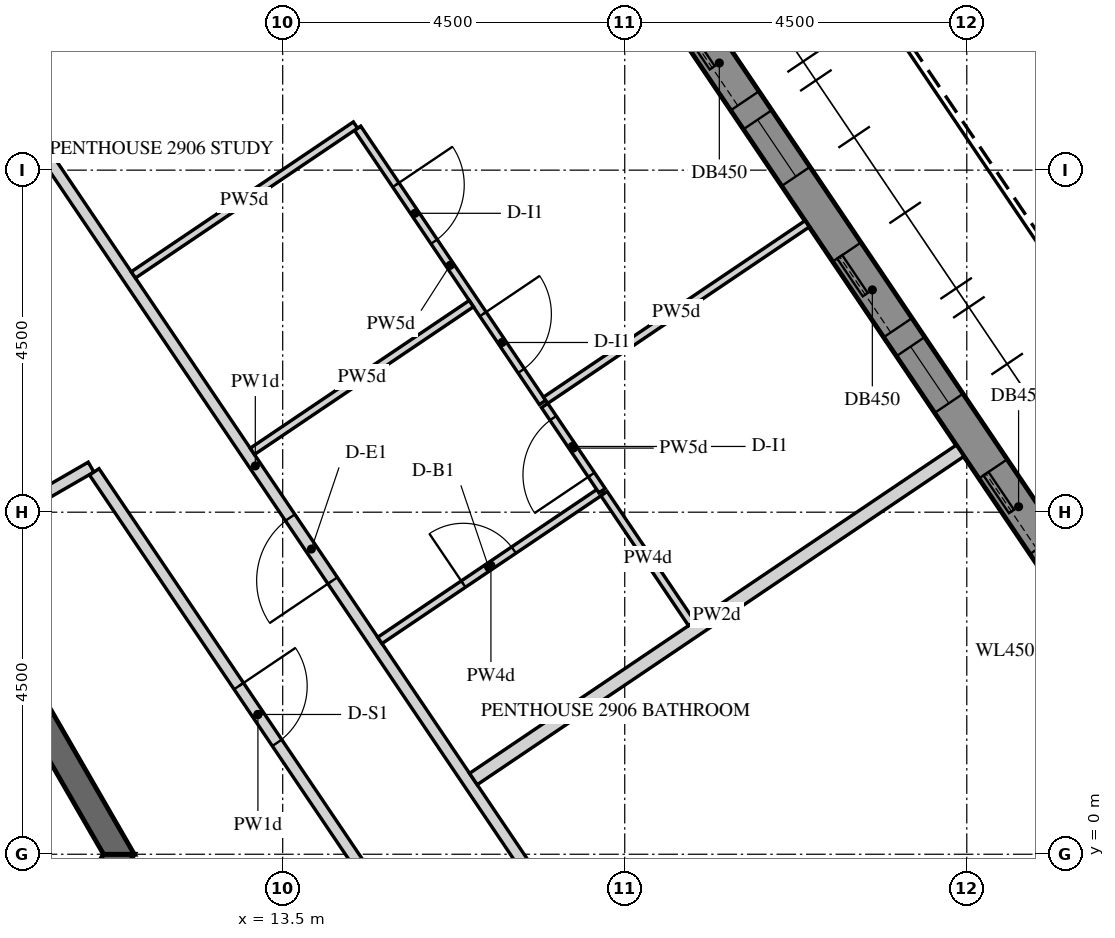
"""IFC4 building model, lengths in metres.
Left out: names, types, materials, properties, quantities, classifications, styles, units other than length and angle.
Written with IfcOpenShell. Run it as: python <this file> out.ifc"""

import sys

from ifc_helpers import new_model, si_unit, direction, frame, frame_2d, origin, place, context, subcontext, project, spatial, polyline, rectangle, outline, extrude, element, fill, save


model = new_model("IFC4")
c1 = context("Model", 3, precision=1e-05, world=origin(), true_north=direction((0.0, 1.0)))
c2 = subcontext(c1, "Body", "Model", "MODEL_VIEW")
j1 = project(units=[si_unit("LENGTHUNIT", "METRE"), si_unit("PLANEANGLEUNIT", "RADIAN")], contexts=[c1])
p1 = place(None, origin())
s1 = spatial("IfcSite", under=j1, at=p1, CompositionType="ELEMENT")
p2 = place(p1, origin())
s2 = spatial("IfcBuilding", under=s1, at=p2, CompositionType="ELEMENT")
p3 = place(p2, frame((0.0, 0.0, 372.9)))
s3 = spatial("IfcBuildingStorey", under=s2, at=p3, CompositionType="ELEMENT", Elevation=372.9)
p4 = place(p3, frame((24.37, 2.811, -0.15), z_axis=(0.0, 0.0, 1.0), x_axis=(-0.559187034749, 0.829041531027, 0.0)))
e1 = element("IfcWall", 1, at=p4, inside=s3, PredefinedType="SOLIDWALL", context=c2, shape_type="SweptSolid", body=[
    extrude(outline(polyline([(0.225, -0.225), (20.506, -0.225), (20.957, 0.225), (-0.225, 0.225), (0.225, -0.225)])), origin(), (0.0, 0.0, 1.0), 3.55),
])
p5 = place(p4, frame((0.325, 0.0, 1.05)))
e2 = element("IfcOpeningElement", 2, at=p5, cuts=e1, PredefinedType="OPENING", context=c2, shape_type="SweptSolid", body=[
    extrude(rectangle(XDim=0.9, YDim=1.5, at=frame_2d((0.45, 0.75))), frame((0.0, 0.235, 0.0), z_axis=(0.0, -1.0, 0.0), x_axis=(1.0, 0.0, 0.0)), (0.0, 0.0, 1.0), 0.47),
])
p6 = place(p4, frame((1.525, 0.0, 0.15)))
e3 = element("IfcOpeningElement", 3, at=p6, cuts=e1, PredefinedType="OPENING", context=c2, shape_type="SweptSolid", body=[
    extrude(rectangle(XDim=1.2, YDim=2.4, at=frame_2d((0.6, 1.2))), frame((0.0, 0.235, 0.0), z_axis=(0.0, -1.0, 0.0), x_axis=(1.0, 0.0, 0.0)), (0.0, 0.0, 1.0), 0.47),
])
p7 = place(p4, frame((3.766, 0.0, 1.05)))
e4 = element("IfcOpeningElement", 4, at=p7, cuts=e1, PredefinedType="OPENING", context=c2, shape_type="SweptSolid", body=[
    extrude(rectangle(XDim=0.9, YDim=1.5, at=frame_2d((0.45, 0.75))), frame((0.0, 0.235, 0.0), z_axis=(0.0, -1.0, 0.0), x_axis=(1.0, 0.0, 0.0)), (0.0, 0.0, 1.0), 0.47),
])
p8 = place(p4, frame((4.966, 0.0, 0.15)))
e5 = element("IfcOpeningElement", 5, at=p8, cuts=e1, PredefinedType="OPENING", context=c2, shape_type="SweptSolid", body=[
    extrude(rectangle(XDim=1.2, YDim=2.4, at=frame_2d((0.6, 1.2))), frame((0.0, 0.235, 0.0), z_axis=(0.0, -1.0, 0.0), x_axis=(1.0, 0.0, 0.0)), (0.0, 0.0, 1.0), 0.47),
])
p9 = place(p4, frame((7.366, 0.0, 1.05)))
e6 = element("IfcOpeningElement", 6, at=p9, cuts=e1, PredefinedType="OPENING", context=c2, shape_type="SweptSolid", body=[
    extrude(rectangle(XDim=0.9, YDim=1.5, at=frame_2d((0.45, 0.75))), frame((0.0, 0.235, 0.0), z_axis=(0.0, -1.0, 0.0), x_axis=(1.0, 0.0, 0.0)), (0.0, 0.0, 1.0), 0.47),
])
p10 = place(p4, frame((8.566, 0.0, 0.15)))
e7 = element("IfcOpeningElement", 7, at=p10, cuts=e1, PredefinedType="OPENING", context=c2, shape_type="SweptSolid", body=[
    extrude(rectangle(XDim=1.2, YDim=2.4, at=frame_2d((0.6, 1.2))), frame((0.0, 0.235, 0.0), z_axis=(0.0, -1.0, 0.0), x_axis=(1.0, 0.0, 0.0)), (0.0, 0.0, 1.0), 0.47),
])
p11 = place(p4, frame((10.966, 0.0, 1.05)))
e8 = element("IfcOpeningElement", 8, at=p11, cuts=e1, PredefinedType="OPENING", context=c2, shape_type="SweptSolid", body=[
    extrude(rectangle(XDim=0.9, YDim=1.5, at=frame_2d((0.45, 0.75))), frame((0.0, 0.235, 0.0), z_axis=(0.0, -1.0, 0.0), x_axis=(1.0, 0.0, 0.0)), (0.0, 0.0, 1.0), 0.47),
])
p12 = place(p4, frame((12.166, 0.0, 0.15)))
e9 = element("IfcOpeningElement", 9, at=p12, cuts=e1, PredefinedType="OPENING", context=c2, shape_type="SweptSolid", body=[
    extrude(rectangle(XDim=1.2, YDim=2.4, at=frame_2d((0.6, 1.2))), frame((0.0, 0.235, 0.0), z_axis=(0.0, -1.0, 0.0), x_axis=(1.0, 0.0, 0.0)), (0.0, 0.0, 1.0), 0.47),
])
p13 = place(p4, frame((14.566, 0.0, 1.05)))
e10 = element("IfcOpeningElement", 10, at=p13, cuts=e1, PredefinedType="OPENING", context=c2, shape_type="SweptSolid", body=[
    extrude(rectangle(XDim=0.9, YDim=1.5, at=frame_2d((0.45, 0.75))), frame((0.0, 0.235, 0.0), z_axis=(0.0, -1.0, 0.0), x_axis=(1.0, 0.0, 0.0)), (0.0, 0.0, 1.0), 0.47),
])
p14 = place(p4, frame((15.766, 0.0, 0.15)))
e11 = element("IfcOpeningElement", 11, at=p14, cuts=e1, PredefinedType="OPENING", context=c2, shape_type="SweptSolid", body=[
    extrude(rectangle(XDim=1.2, YDim=2.4, at=frame_2d((0.6, 1.2))), frame((0.0, 0.235, 0.0), z_axis=(0.0, -1.0, 0.0), x_axis=(1.0, 0.0, 0.0)), (0.0, 0.0, 1.0), 0.47),
])
p15 = place(p4, frame((18.007, 0.0, 1.05)))
e12 = element("IfcOpeningElement", 12, at=p15, cuts=e1, PredefinedType="OPENING", context=c2, shape_type="SweptSolid", body=[
    extrude(rectangle(XDim=0.9, YDim=1.5, at=frame_2d((0.45, 0.75))), frame((0.0, 0.235, 0.0), z_axis=(0.0, -1.0, 0.0), x_axis=(1.0, 0.0, 0.0)), (0.0, 0.0, 1.0), 0.47),
])
p16 = place(p4, frame((19.207, 0.0, 0.15)))
e13 = element("IfcOpeningElement", 13, at=p16, cuts=e1, PredefinedType="OPENING", context=c2, shape_type="SweptSolid", body=[
    extrude(rectangle(XDim=1.2, YDim=2.4, at=frame_2d((0.6, 1.2))), frame((0.0, 0.235, 0.0), z_axis=(0.0, -1.0, 0.0), x_axis=(1.0, 0.0, 0.0)), (0.0, 0.0, 1.0), 0.47),
])
p17 = place(p3, frame((5.673, -9.825, -0.15), z_axis=(0.0, 0.0, 1.0), x_axis=(0.499995046907, 0.866028263435, 0.0)))
e14 = element("IfcWall", 14, at=p17, inside=s3, PredefinedType="SHEAR", context=c2, shape_type="SweptSolid", body=[
    extrude(outline(polyline([(-0.101, -0.175), (11.446, -0.175), (11.244, 0.175), (0.101, 0.175), (-0.101, -0.175)])), origin(), (0.0, 0.0, 1.0), 3.55),
])
p18 = place(p17, frame((4.801, 0.0, 0.15)))
e15 = element("IfcOpeningElement", 15, at=p18, cuts=e14, PredefinedType="OPENING", context=c2, shape_type="SweptSolid", body=[
    extrude(rectangle(XDim=1.8, YDim=2.4, at=frame_2d((0.9, 1.2))), frame((0.0, 0.185, 0.0), z_axis=(0.0, -1.0, 0.0), x_axis=(1.0, 0.0, 0.0)), (0.0, 0.0, 1.0), 0.37),
])
p19 = place(p3, frame((11.345, 0.0, -0.15), z_axis=(0.0, 0.0, 1.0), x_axis=(-0.499995046907, 0.866028263435, 0.0)))
e16 = element("IfcWall", 16, at=p19, inside=s3, PredefinedType="SHEAR", context=c2, shape_type="SweptSolid", body=[
    extrude(outline(polyline([(-0.101, -0.175), (11.446, -0.175), (11.244, 0.175), (0.101, 0.175), (-0.101, -0.175)])), origin(), (0.0, 0.0, 1.0), 3.55),
])
p20 = place(p19, frame((4.744, 0.0, 0.15)))
e17 = element("IfcOpeningElement", 17, at=p20, cuts=e16, PredefinedType="OPENING", context=c2, shape_type="SweptSolid", body=[
    extrude(rectangle(XDim=1.8, YDim=2.4, at=frame_2d((0.9, 1.2))), frame((0.0, 0.185, 0.0), z_axis=(0.0, -1.0, 0.0), x_axis=(1.0, 0.0, 0.0)), (0.0, 0.0, 1.0), 0.37),
])
p21 = place(p3, frame((5.773, 10.0, -0.15), z_axis=(0.0, 0.0, 1.0), x_axis=(0.500007911273, 0.866020836161, 0.0)))
e18 = element("IfcWall", 18, at=p21, inside=s3, PredefinedType="SHEAR", context=c2, shape_type="SweptSolid", body=[
    extrude(rectangle(XDim=14.51, YDim=0.35, at=frame_2d((7.255, 0.0))), origin(), (0.0, 0.0, 1.0), 3.55),
])
p22 = place(p21, frame((6.355, 0.0, 0.15)))
e19 = element("IfcOpeningElement", 19, at=p22, cuts=e18, PredefinedType="OPENING", context=c2, shape_type="SweptSolid", body=[
    extrude(rectangle(XDim=1.8, YDim=2.4, at=frame_2d((0.9, 1.2))), frame((0.0, 0.185, 0.0), z_axis=(0.0, -1.0, 0.0), x_axis=(1.0, 0.0, 0.0)), (0.0, 0.0, 1.0), 0.37),
])
p23 = place(p3, frame((17.401, -1.21, 0.0), z_axis=(0.0, 0.0, 1.0), x_axis=(-0.559186729505, 0.829041736914, 0.0)))
e20 = element("IfcWall", 20, at=p23, inside=s3, PredefinedType="PARTITIONING", context=c2, shape_type="SweptSolid", body=[
    extrude(rectangle(XDim=15.243, YDim=0.15, at=frame_2d((7.621, 0.0))), origin(), (0.0, 0.0, 1.0), 2.47),
])
p24 = place(p23, frame((5.802, 0.0, 0.0)))
e21 = element("IfcOpeningElement", 21, at=p24, cuts=e20, PredefinedType="OPENING", context=c2, shape_type="SweptSolid", body=[
    extrude(rectangle(XDim=1.0, YDim=2.1, at=frame_2d((0.5, 1.05))), frame((0.0, 0.085, 0.0), z_axis=(0.0, -1.0, 0.0), x_axis=(1.0, 0.0, 0.0)), (0.0, 0.0, 1.0), 0.17),
])
p25 = place(p3, frame((9.2, 4.066, 0.0), z_axis=(0.0, 0.0, 1.0), x_axis=(0.866011447264, 0.500024172624, 0.0)))
e22 = element("IfcWall", 22, at=p25, inside=s3, PredefinedType="PARTITIONING", context=c2, shape_type="SweptSolid", body=[
    extrude(rectangle(XDim=2.055, YDim=0.15, at=frame_2d((1.027, 0.0))), origin(), (0.0, 0.0, 1.0), 2.47),
])
p26 = place(p3, frame((11.021, 5.031, 0.0), z_axis=(0.0, 0.0, 1.0), x_axis=(0.559191842266, -0.829038288346, 0.0)))
e23 = element("IfcWall", 23, at=p26, inside=s3, PredefinedType="PARTITIONING", context=c2, shape_type="SweptSolid", body=[
    extrude(rectangle(XDim=7.7, YDim=0.15, at=frame_2d((3.85, 0.0))), origin(), (0.0, 0.0, 1.0), 2.47),
])
p27 = place(p26, frame((3.4, 0.0, 0.0)))
e24 = element("IfcOpeningElement", 24, at=p27, cuts=e23, PredefinedType="OPENING", context=c2, shape_type="SweptSolid", body=[
    extrude(rectangle(XDim=0.9, YDim=2.1, at=frame_2d((0.45, 1.05))), frame((0.0, 0.085, 0.0), z_axis=(0.0, -1.0, 0.0), x_axis=(1.0, 0.0, 0.0)), (0.0, 0.0, 1.0), 0.17),
])
p28 = place(p3, frame((22.413, 5.309, 0.0), z_axis=(0.0, 0.0, 1.0), x_axis=(-0.82903328576, -0.559199258853, 0.0)))
e25 = element("IfcWall", 25, at=p28, inside=s3, PredefinedType="PARTITIONING", context=c2, shape_type="SweptSolid", body=[
    extrude(rectangle(XDim=7.725, YDim=0.18, at=frame_2d((3.863, 0.0))), origin(), (0.0, 0.0, 1.0), 2.47),
])
p29 = place(p3, frame((14.485, 9.552, 0.0), z_axis=(0.0, 0.0, 1.0), x_axis=(0.559171259418, -0.829052171242, 0.0)))
e26 = element("IfcWall", 26, at=p29, inside=s3, PredefinedType="PARTITIONING", context=c2, shape_type="SweptSolid", body=[
    extrude(rectangle(XDim=4.352, YDim=0.1, at=frame_2d((2.176, 0.0))), origin(), (0.0, 0.0, 1.0), 2.47),
])
p30 = place(p29, frame((2.95, 0.0, 0.0)))
e27 = element("IfcOpeningElement", 27, at=p30, cuts=e26, PredefinedType="OPENING", context=c2, shape_type="SweptSolid", body=[
    extrude(rectangle(XDim=0.9, YDim=2.1, at=frame_2d((0.45, 1.05))), frame((0.0, 0.06, 0.0), z_axis=(0.0, -1.0, 0.0), x_axis=(1.0, 0.0, 0.0)), (0.0, 0.0, 1.0), 0.12),
])
p31 = place(p29, frame((0.9, 0.0, 0.0)))
e28 = element("IfcOpeningElement", 28, at=p31, cuts=e26, PredefinedType="OPENING", context=c2, shape_type="SweptSolid", body=[
    extrude(rectangle(XDim=0.9, YDim=2.1, at=frame_2d((0.45, 1.05))), frame((0.0, 0.06, 0.0), z_axis=(0.0, -1.0, 0.0), x_axis=(1.0, 0.0, 0.0)), (0.0, 0.0, 1.0), 0.12),
])
p32 = place(p3, frame((16.959, 5.973, 0.0), z_axis=(0.0, 0.0, 1.0), x_axis=(0.829060712991, 0.559158594833, 0.0)))
e29 = element("IfcWall", 29, at=p32, inside=s3, PredefinedType="PARTITIONING", context=c2, shape_type="SweptSolid", body=[
    extrude(rectangle(XDim=4.15, YDim=0.1, at=frame_2d((2.075, 0.0))), origin(), (0.0, 0.0, 1.0), 2.47),
])
p33 = place(p3, frame((11.535, 7.622, 0.0), z_axis=(0.0, 0.0, 1.0), x_axis=(0.829033300448, 0.559199237078, 0.0)))
e30 = element("IfcWall", 30, at=p33, inside=s3, PredefinedType="PARTITIONING", context=c2, shape_type="SweptSolid", body=[
    extrude(rectangle(XDim=3.525, YDim=0.1, at=frame_2d((1.763, 0.0))), origin(), (0.0, 0.0, 1.0), 2.47),
])
p34 = place(p3, frame((14.778, 2.813, 0.0), z_axis=(0.0, 0.0, 1.0), x_axis=(0.829033300448, 0.559199237078, 0.0)))
e31 = element("IfcWall", 31, at=p34, inside=s3, PredefinedType="PARTITIONING", context=c2, shape_type="SweptSolid", body=[
    extrude(rectangle(XDim=3.525, YDim=0.1, at=frame_2d((1.763, 0.0))), origin(), (0.0, 0.0, 1.0), 2.47),
])
p35 = place(p34, frame((1.325, 0.0, 0.0)))
e32 = element("IfcOpeningElement", 32, at=p35, cuts=e31, PredefinedType="OPENING", context=c2, shape_type="SweptSolid", body=[
    extrude(rectangle(XDim=0.8, YDim=2.1, at=frame_2d((0.4, 1.05))), frame((0.0, 0.06, 0.0), z_axis=(0.0, -1.0, 0.0), x_axis=(1.0, 0.0, 0.0)), (0.0, 0.0, 1.0), 0.12),
])
p36 = place(p3, frame((17.702, 4.783, 0.0), z_axis=(0.0, 0.0, 1.0), x_axis=(-0.559150326391, 0.829066289567, 0.0)))
e33 = element("IfcWall", 33, at=p36, inside=s3, PredefinedType="PARTITIONING", context=c2, shape_type="SweptSolid", body=[
    extrude(rectangle(XDim=1.352, YDim=0.1, at=frame_2d((0.676, 0.0))), origin(), (0.0, 0.0, 1.0), 2.47),
])
p37 = place(p36, frame((0.252, 0.0, 0.0)))
e34 = element("IfcOpeningElement", 34, at=p37, cuts=e33, PredefinedType="OPENING", context=c2, shape_type="SweptSolid", body=[
    extrude(rectangle(XDim=0.9, YDim=2.1, at=frame_2d((0.45, 1.05))), frame((0.0, 0.06, 0.0), z_axis=(0.0, -1.0, 0.0), x_axis=(1.0, 0.0, 0.0)), (0.0, 0.0, 1.0), 0.12),
])
p38 = place(p3, frame((15.982, 7.244, 0.0), z_axis=(0.0, 0.0, 1.0), x_axis=(-0.829044102949, -0.559183221642, 0.0)))
e35 = element("IfcWall", 35, at=p38, inside=s3, PredefinedType="PARTITIONING", context=c2, shape_type="SweptSolid", body=[
    extrude(rectangle(XDim=3.475, YDim=0.1, at=frame_2d((1.737, 0.0))), origin(), (0.0, 0.0, 1.0), 2.47),
])
p39 = place(p3, frame((18.881, 3.035, 0.0), z_axis=(0.0, 0.0, 1.0), x_axis=(-0.559200338399, 0.829032557584, 0.0)))
e36 = element("IfcWall", 36, at=p39, inside=s3, PredefinedType="PARTITIONING", context=c2, shape_type="SweptSolid", body=[
    extrude(rectangle(XDim=2.062, YDim=0.1, at=frame_2d((1.031, 0.0))), origin(), (0.0, 0.0, 1.0), 2.47),
])
p40 = place(p6, frame((0.0, 0.15, 0.0)))
e37 = element("IfcDoor", 37, at=p40, inside=s3, OperationType="SLIDING_TO_LEFT", PredefinedType="DOOR", context=c2, shape_type="SweptSolid", body=[
    extrude(rectangle(XDim=1.2, YDim=2.4, at=frame_2d((0.6, 1.2))), frame((0.0, 0.025, 0.0), z_axis=(0.0, -1.0, 0.0), x_axis=(1.0, 0.0, 0.0)), (0.0, 0.0, 1.0), 0.05),
])
fill(e3, e37)
p41 = place(p7, frame((0.0, 0.155, 0.0)))
e38 = element("IfcWindow", 38, at=p41, inside=s3, PartitioningType="SINGLE_PANEL", PredefinedType="WINDOW", context=c2, shape_type="SweptSolid", body=[
    extrude(rectangle(XDim=0.9, YDim=1.5, at=frame_2d((0.45, 0.75))), frame((0.0, 0.03, 0.0), z_axis=(0.0, -1.0, 0.0), x_axis=(1.0, 0.0, 0.0)), (0.0, 0.0, 1.0), 0.06),
])
fill(e4, e38)
p42 = place(p8, frame((0.0, 0.15, 0.0)))
e39 = element("IfcDoor", 39, at=p42, inside=s3, OperationType="SLIDING_TO_LEFT", PredefinedType="DOOR", context=c2, shape_type="SweptSolid", body=[
    extrude(rectangle(XDim=1.2, YDim=2.4, at=frame_2d((0.6, 1.2))), frame((0.0, 0.025, 0.0), z_axis=(0.0, -1.0, 0.0), x_axis=(1.0, 0.0, 0.0)), (0.0, 0.0, 1.0), 0.05),
])
fill(e5, e39)
p43 = place(p9, frame((0.0, 0.155, 0.0)))
e40 = element("IfcWindow", 40, at=p43, inside=s3, PartitioningType="SINGLE_PANEL", PredefinedType="WINDOW", context=c2, shape_type="SweptSolid", body=[
    extrude(rectangle(XDim=0.9, YDim=1.5, at=frame_2d((0.45, 0.75))), frame((0.0, 0.03, 0.0), z_axis=(0.0, -1.0, 0.0), x_axis=(1.0, 0.0, 0.0)), (0.0, 0.0, 1.0), 0.06),
])
fill(e6, e40)
p44 = place(p10, frame((0.0, 0.15, 0.0)))
e41 = element("IfcDoor", 41, at=p44, inside=s3, OperationType="SLIDING_TO_LEFT", PredefinedType="DOOR", context=c2, shape_type="SweptSolid", body=[
    extrude(rectangle(XDim=1.2, YDim=2.4, at=frame_2d((0.6, 1.2))), frame((0.0, 0.025, 0.0), z_axis=(0.0, -1.0, 0.0), x_axis=(1.0, 0.0, 0.0)), (0.0, 0.0, 1.0), 0.05),
])
fill(e7, e41)
p45 = place(p24, origin())
e42 = element("IfcDoor", 42, at=p45, inside=s3, OperationType="SINGLE_SWING_RIGHT", PredefinedType="DOOR", context=c2, shape_type="SweptSolid", body=[
    extrude(rectangle(XDim=1.0, YDim=2.1, at=frame_2d((0.5, 1.05))), frame((0.0, 0.025, 0.0), z_axis=(0.0, -1.0, 0.0), x_axis=(1.0, 0.0, 0.0)), (0.0, 0.0, 1.0), 0.05),
])
fill(e21, e42)
p46 = place(p35, origin())
e43 = element("IfcDoor", 43, at=p46, inside=s3, OperationType="SINGLE_SWING_RIGHT", PredefinedType="DOOR", context=c2, shape_type="SweptSolid", body=[
    extrude(rectangle(XDim=0.8, YDim=2.1, at=frame_2d((0.4, 1.05))), frame((0.0, 0.025, 0.0), z_axis=(0.0, -1.0, 0.0), x_axis=(1.0, 0.0, 0.0)), (0.0, 0.0, 1.0), 0.05),
])
fill(e32, e43)
p47 = place(p30, origin())
e44 = element("IfcDoor", 44, at=p47, inside=s3, OperationType="SINGLE_SWING_RIGHT", PredefinedType="DOOR", context=c2, shape_type="SweptSolid", body=[
    extrude(rectangle(XDim=0.9, YDim=2.1, at=frame_2d((0.45, 1.05))), frame((0.0, 0.025, 0.0), z_axis=(0.0, -1.0, 0.0), x_axis=(1.0, 0.0, 0.0)), (0.0, 0.0, 1.0), 0.05),
])
fill(e27, e44)
p48 = place(p37, origin())
e45 = element("IfcDoor", 45, at=p48, inside=s3, OperationType="SINGLE_SWING_LEFT", PredefinedType="DOOR", context=c2, shape_type="SweptSolid", body=[
    extrude(rectangle(XDim=0.9, YDim=2.1, at=frame_2d((0.45, 1.05))), frame((0.0, 0.025, 0.0), z_axis=(0.0, -1.0, 0.0), x_axis=(1.0, 0.0, 0.0)), (0.0, 0.0, 1.0), 0.05),
])
fill(e34, e45)
p49 = place(p31, origin())
e46 = element("IfcDoor", 46, at=p49, inside=s3, OperationType="SINGLE_SWING_RIGHT", PredefinedType="DOOR", context=c2, shape_type="SweptSolid", body=[
    extrude(rectangle(XDim=0.9, YDim=2.1, at=frame_2d((0.45, 1.05))), frame((0.0, 0.025, 0.0), z_axis=(0.0, -1.0, 0.0), x_axis=(1.0, 0.0, 0.0)), (0.0, 0.0, 1.0), 0.05),
])
fill(e28, e46)
p50 = place(p27, origin())
e47 = element("IfcDoor", 47, at=p50, inside=s3, OperationType="SINGLE_SWING_LEFT", PredefinedType="DOOR", context=c2, shape_type="SweptSolid", body=[
    extrude(rectangle(XDim=0.9, YDim=2.1, at=frame_2d((0.45, 1.05))), frame((0.0, 0.025, 0.0), z_axis=(0.0, -1.0, 0.0), x_axis=(1.0, 0.0, 0.0)), (0.0, 0.0, 1.0), 0.05),
])
fill(e24, e47)
save(model, sys.argv[1])
